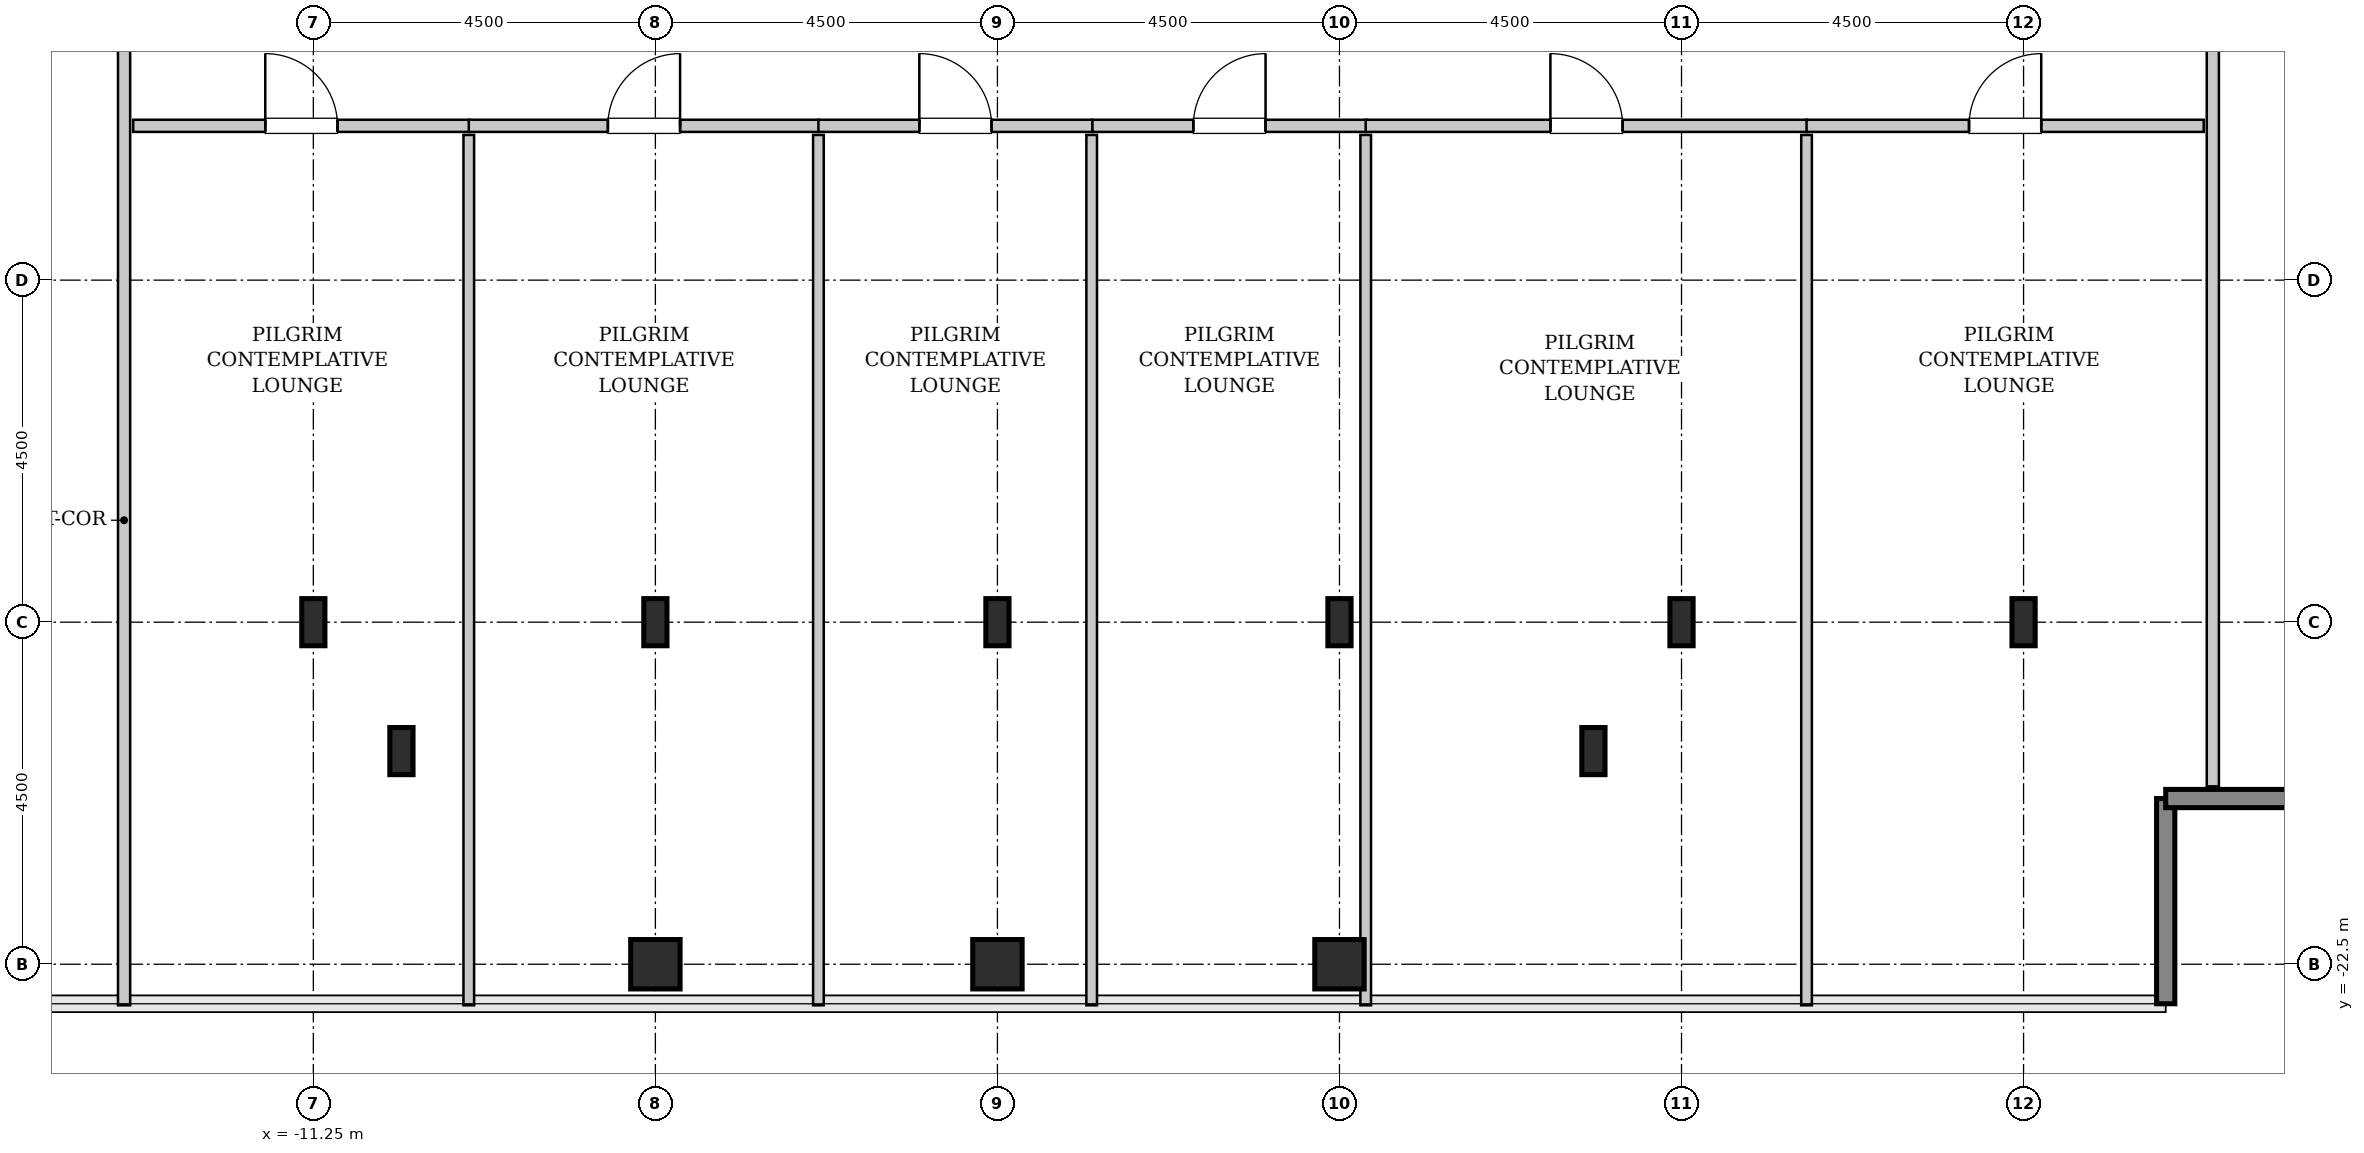
"""IFC4 building model, lengths in metres.
Left out: names, types, materials, properties, quantities, classifications, styles, units other than length and angle.
Written with IfcOpenShell. Run it as: python <this file> out.ifc"""

import sys

from ifc_helpers import new_model, si_unit, direction, frame, frame_2d, origin, origin_2d, place, context, subcontext, project, spatial, rectangle, hollow_rectangle, i_section, extrude, source, transform, mapped, element, fill, save


model = new_model("IFC4")
c1 = context("Model", 3, precision=1e-05, world=origin(), true_north=direction((0.0, 1.0)))
c2 = subcontext(c1, "Body", "Model", "MODEL_VIEW")
j1 = project(units=[si_unit("LENGTHUNIT", "METRE"), si_unit("PLANEANGLEUNIT", "RADIAN")], contexts=[c1])
p1 = place(None, origin())
s1 = spatial("IfcSite", under=j1, at=p1, CompositionType="ELEMENT")
p2 = place(p1, origin())
s2 = spatial("IfcBuilding", under=s1, at=p2, CompositionType="ELEMENT")
p3 = place(p2, frame((0.0, 0.0, 264.6)))
s3 = spatial("IfcBuildingStorey", under=s2, at=p3, CompositionType="ELEMENT", Elevation=264.6)
m1 = source(origin(), c2, "Body", "SweptSolid", [
    extrude(i_section(OverallWidth=0.305, OverallDepth=0.62, WebThickness=0.021, FlangeThickness=0.04, FilletRadius=0.027, at=origin_2d()), origin(), (0.0, 0.0, 1.0), 3.8),
])
for number, where, z_axis, x_axis in (
    (1, (-11.25, -18.0, 0.0), (0.0, 0.0, 1.0), (1.0, 0.0, 0.0)),
    (2, (-10.091, -19.696, 0.0), (0.0, 0.0, 1.0), (1.0, 0.0, 0.0)),
):
    element("IfcColumn", number, at=place(p3, frame(where, z_axis=z_axis, x_axis=x_axis)), inside=s3, PredefinedType="COLUMN", context=c2, shape_type="MappedRepresentation", body=[
        mapped(m1, transform((0.0, 0.0, 0.0), x_axis=(1.0, 0.0, 0.0), y_axis=(0.0, 1.0, 0.0), z_axis=(0.0, 0.0, 1.0), scale=1.0)),
    ])
m2 = source(origin(), c2, "Body", "SweptSolid", [
    extrude(hollow_rectangle(XDim=0.65, YDim=0.65, WallThickness=0.032, InnerFilletRadius=0.032, OuterFilletRadius=0.064, at=origin_2d()), origin(), (0.0, 0.0, 1.0), 3.8),
])
p4 = place(p3, frame((-6.75, -22.5, 0.0), z_axis=(0.0, 0.0, 1.0), x_axis=(1.0, 0.0, 0.0)))
e3 = element("IfcColumn", 3, at=p4, inside=s3, PredefinedType="COLUMN", context=c2, shape_type="MappedRepresentation", body=[
    mapped(m2, transform((0.0, 0.0, 0.0), x_axis=(1.0, 0.0, 0.0), y_axis=(0.0, 1.0, 0.0), z_axis=(0.0, 0.0, 1.0), scale=1.0)),
])
p5 = place(p3, frame((-6.75, -18.0, 0.0), z_axis=(0.0, 0.0, 1.0), x_axis=(1.0, 0.0, 0.0)))
e4 = element("IfcColumn", 4, at=p5, inside=s3, PredefinedType="COLUMN", context=c2, shape_type="MappedRepresentation", body=[
    mapped(m1, transform((0.0, 0.0, 0.0), x_axis=(1.0, 0.0, 0.0), y_axis=(0.0, 1.0, 0.0), z_axis=(0.0, 0.0, 1.0), scale=1.0)),
])
p6 = place(p3, frame((-2.25, -22.5, 0.0), z_axis=(0.0, 0.0, 1.0), x_axis=(1.0, 0.0, 0.0)))
e5 = element("IfcColumn", 5, at=p6, inside=s3, PredefinedType="COLUMN", context=c2, shape_type="MappedRepresentation", body=[
    mapped(m2, transform((0.0, 0.0, 0.0), x_axis=(1.0, 0.0, 0.0), y_axis=(0.0, 1.0, 0.0), z_axis=(0.0, 0.0, 1.0), scale=1.0)),
])
p7 = place(p3, frame((-2.25, -18.0, 0.0), z_axis=(0.0, 0.0, 1.0), x_axis=(1.0, 0.0, 0.0)))
e6 = element("IfcColumn", 6, at=p7, inside=s3, PredefinedType="COLUMN", context=c2, shape_type="MappedRepresentation", body=[
    mapped(m1, transform((0.0, 0.0, 0.0), x_axis=(1.0, 0.0, 0.0), y_axis=(0.0, 1.0, 0.0), z_axis=(0.0, 0.0, 1.0), scale=1.0)),
])
p8 = place(p3, frame((2.25, -22.5, 0.0), z_axis=(0.0, 0.0, 1.0), x_axis=(1.0, 0.0, 0.0)))
e7 = element("IfcColumn", 7, at=p8, inside=s3, PredefinedType="COLUMN", context=c2, shape_type="MappedRepresentation", body=[
    mapped(m2, transform((0.0, 0.0, 0.0), x_axis=(1.0, 0.0, 0.0), y_axis=(0.0, 1.0, 0.0), z_axis=(0.0, 0.0, 1.0), scale=1.0)),
])
for number, where, z_axis, x_axis in (
    (8, (2.25, -18.0, 0.0), (0.0, 0.0, 1.0), (1.0, 0.0, 0.0)),
    (9, (5.591, -19.696, 0.0), (0.0, 0.0, 1.0), (1.0, 0.0, 0.0)),
    (10, (6.75, -18.0, 0.0), (0.0, 0.0, 1.0), (1.0, 0.0, 0.0)),
    (11, (11.25, -18.0, 0.0), (0.0, 0.0, 1.0), (1.0, 0.0, 0.0)),
):
    element("IfcColumn", number, at=place(p3, frame(where, z_axis=z_axis, x_axis=x_axis)), inside=s3, PredefinedType="COLUMN", context=c2, shape_type="MappedRepresentation", body=[
        mapped(m1, transform((0.0, 0.0, 0.0), x_axis=(1.0, 0.0, 0.0), y_axis=(0.0, 1.0, 0.0), z_axis=(0.0, 0.0, 1.0), scale=1.0)),
    ])
m3 = source(origin(), c2, "Body", "SweptSolid", [
    extrude(rectangle(XDim=2.7, YDim=0.24, at=frame_2d((1.35, 0.0))), origin(), (0.0, 0.0, 1.0), 3.55),
])
for number, where, z_axis, x_axis in (
    (12, (13.12, -23.02, 0.0), (0.0, 0.0, 1.0), (0.0, 1.0, 0.0)),
    (13, (13.12, -20.32, 0.0), (0.0, 0.0, 1.0), (1.0, 0.0, 0.0)),
):
    element("IfcWall", number, at=place(p3, frame(where, z_axis=z_axis, x_axis=x_axis)), inside=s3, PredefinedType="SHEAR", context=c2, shape_type="MappedRepresentation", body=[
        mapped(m3, transform((0.0, 0.0, 0.0), x_axis=(1.0, 0.0, 0.0), y_axis=(0.0, 1.0, 0.0), z_axis=(0.0, 0.0, 1.0), scale=1.0)),
    ])
m4 = source(origin(), c2, "Body", "SweptSolid", [
    extrude(rectangle(XDim=14.845, YDim=0.16, at=frame_2d((7.422, 0.0))), origin(), (0.0, 0.0, 1.0), 3.535),
])
p9 = place(p3, frame((-13.74, -23.04, 0.0), z_axis=(0.0, 0.0, 1.0), x_axis=(0.0, 1.0, 0.0)))
e14 = element("IfcWall", 14, at=p9, inside=s3, PredefinedType="PARTITIONING", context=c2, shape_type="MappedRepresentation", body=[
    mapped(m4, transform((0.0, 0.0, 0.0), x_axis=(1.0, 0.0, 0.0), y_axis=(0.0, 1.0, 0.0), z_axis=(0.0, 0.0, 1.0), scale=1.0)),
])
p10 = place(p9, frame((12.712, 0.0, 0.0)))
e15 = element("IfcOpeningElement", 15, at=p10, cuts=e14, PredefinedType="OPENING", context=c2, shape_type="SweptSolid", body=[
    extrude(rectangle(XDim=0.95, YDim=2.1, at=frame_2d((0.475, 1.05))), frame((0.0, 0.09, 0.0), z_axis=(0.0, -1.0, 0.0), x_axis=(1.0, 0.0, 0.0)), (0.0, 0.0, 1.0), 0.18),
])
m5 = source(origin(), c2, "Body", "SweptSolid", [
    extrude(rectangle(XDim=11.765, YDim=0.16, at=frame_2d((5.882, 0.0))), origin(), (0.0, 0.0, 1.0), 3.535),
])
p11 = place(p3, frame((13.74, -20.16, 0.0), z_axis=(0.0, 0.0, 1.0), x_axis=(0.0, 1.0, 0.0)))
e16 = element("IfcWall", 16, at=p11, inside=s3, PredefinedType="PARTITIONING", context=c2, shape_type="MappedRepresentation", body=[
    mapped(m5, transform((0.0, 0.0, 0.0), x_axis=(1.0, 0.0, 0.0), y_axis=(0.0, 1.0, 0.0), z_axis=(0.0, 0.0, 1.0), scale=1.0)),
])
p12 = place(p11, frame((9.732, 0.0, 0.0)))
e17 = element("IfcOpeningElement", 17, at=p12, cuts=e16, PredefinedType="OPENING", context=c2, shape_type="SweptSolid", body=[
    extrude(rectangle(XDim=0.95, YDim=2.1, at=frame_2d((0.475, 1.05))), frame((0.0, 0.09, 0.0), z_axis=(0.0, -1.0, 0.0), x_axis=(1.0, 0.0, 0.0)), (0.0, 0.0, 1.0), 0.18),
])
m6 = source(origin(), c2, "Body", "SweptSolid", [
    extrude(rectangle(XDim=4.425, YDim=0.16, at=frame_2d((2.212, 0.0))), origin(), (0.0, 0.0, 1.0), 3.535),
])
p13 = place(p3, frame((-13.62, -11.47, 0.0), z_axis=(0.0, 0.0, 1.0), x_axis=(1.0, 0.0, 0.0)))
e18 = element("IfcWall", 18, at=p13, inside=s3, PredefinedType="PARTITIONING", context=c2, shape_type="MappedRepresentation", body=[
    mapped(m6, transform((0.0, 0.0, 0.0), x_axis=(1.0, 0.0, 0.0), y_axis=(0.0, 1.0, 0.0), z_axis=(0.0, 0.0, 1.0), scale=1.0)),
])
p14 = place(p13, frame((1.738, 0.0, 0.0)))
e19 = element("IfcOpeningElement", 19, at=p14, cuts=e18, PredefinedType="OPENING", context=c2, shape_type="SweptSolid", body=[
    extrude(rectangle(XDim=0.95, YDim=2.1, at=frame_2d((0.475, 1.05))), frame((0.0, 0.09, 0.0), z_axis=(0.0, -1.0, 0.0), x_axis=(1.0, 0.0, 0.0)), (0.0, 0.0, 1.0), 0.18),
])
m7 = source(origin(), c2, "Body", "SweptSolid", [
    extrude(rectangle(XDim=11.45, YDim=0.14, at=frame_2d((5.725, 0.0))), origin(), (0.0, 0.0, 1.0), 3.535),
])
p15 = place(p3, frame((-9.205, -23.04, 0.0), z_axis=(0.0, 0.0, 1.0), x_axis=(0.0, 1.0, 0.0)))
e20 = element("IfcWall", 20, at=p15, inside=s3, PredefinedType="PARTITIONING", context=c2, shape_type="MappedRepresentation", body=[
    mapped(m7, transform((0.0, 0.0, 0.0), x_axis=(1.0, 0.0, 0.0), y_axis=(0.0, 1.0, 0.0), z_axis=(0.0, 0.0, 1.0), scale=1.0)),
])
m8 = source(origin(), c2, "Body", "SweptSolid", [
    extrude(rectangle(XDim=4.61, YDim=0.16, at=frame_2d((2.305, 0.0))), origin(), (0.0, 0.0, 1.0), 3.535),
])
p16 = place(p3, frame((-9.205, -11.47, 0.0), z_axis=(0.0, 0.0, 1.0), x_axis=(1.0, 0.0, 0.0)))
e21 = element("IfcWall", 21, at=p16, inside=s3, PredefinedType="PARTITIONING", context=c2, shape_type="MappedRepresentation", body=[
    mapped(m8, transform((0.0, 0.0, 0.0), x_axis=(1.0, 0.0, 0.0), y_axis=(0.0, 1.0, 0.0), z_axis=(0.0, 0.0, 1.0), scale=1.0)),
])
p17 = place(p16, frame((1.83, 0.0, 0.0)))
e22 = element("IfcOpeningElement", 22, at=p17, cuts=e21, PredefinedType="OPENING", context=c2, shape_type="SweptSolid", body=[
    extrude(rectangle(XDim=0.95, YDim=2.1, at=frame_2d((0.475, 1.05))), frame((0.0, 0.09, 0.0), z_axis=(0.0, -1.0, 0.0), x_axis=(1.0, 0.0, 0.0)), (0.0, 0.0, 1.0), 0.18),
])
p18 = place(p3, frame((-4.605, -23.04, 0.0), z_axis=(0.0, 0.0, 1.0), x_axis=(0.0, 1.0, 0.0)))
e23 = element("IfcWall", 23, at=p18, inside=s3, PredefinedType="PARTITIONING", context=c2, shape_type="MappedRepresentation", body=[
    mapped(m7, transform((0.0, 0.0, 0.0), x_axis=(1.0, 0.0, 0.0), y_axis=(0.0, 1.0, 0.0), z_axis=(0.0, 0.0, 1.0), scale=1.0)),
])
m9 = source(origin(), c2, "Body", "SweptSolid", [
    extrude(rectangle(XDim=3.605, YDim=0.16, at=frame_2d((1.802, 0.0))), origin(), (0.0, 0.0, 1.0), 3.535),
])
p19 = place(p3, frame((-4.605, -11.47, 0.0), z_axis=(0.0, 0.0, 1.0), x_axis=(1.0, 0.0, 0.0)))
e24 = element("IfcWall", 24, at=p19, inside=s3, PredefinedType="PARTITIONING", context=c2, shape_type="MappedRepresentation", body=[
    mapped(m9, transform((0.0, 0.0, 0.0), x_axis=(1.0, 0.0, 0.0), y_axis=(0.0, 1.0, 0.0), z_axis=(0.0, 0.0, 1.0), scale=1.0)),
])
p20 = place(p19, frame((1.327, 0.0, 0.0)))
e25 = element("IfcOpeningElement", 25, at=p20, cuts=e24, PredefinedType="OPENING", context=c2, shape_type="SweptSolid", body=[
    extrude(rectangle(XDim=0.95, YDim=2.1, at=frame_2d((0.475, 1.05))), frame((0.0, 0.09, 0.0), z_axis=(0.0, -1.0, 0.0), x_axis=(1.0, 0.0, 0.0)), (0.0, 0.0, 1.0), 0.18),
])
p21 = place(p3, frame((-1.01, -23.04, 0.0), z_axis=(0.0, 0.0, 1.0), x_axis=(0.0, 1.0, 0.0)))
e26 = element("IfcWall", 26, at=p21, inside=s3, PredefinedType="PARTITIONING", context=c2, shape_type="MappedRepresentation", body=[
    mapped(m7, transform((0.0, 0.0, 0.0), x_axis=(1.0, 0.0, 0.0), y_axis=(0.0, 1.0, 0.0), z_axis=(0.0, 0.0, 1.0), scale=1.0)),
])
p22 = place(p3, frame((-1.0, -11.47, 0.0), z_axis=(0.0, 0.0, 1.0), x_axis=(1.0, 0.0, 0.0)))
e27 = element("IfcWall", 27, at=p22, inside=s3, PredefinedType="PARTITIONING", context=c2, shape_type="MappedRepresentation", body=[
    mapped(m9, transform((0.0, 0.0, 0.0), x_axis=(1.0, 0.0, 0.0), y_axis=(0.0, 1.0, 0.0), z_axis=(0.0, 0.0, 1.0), scale=1.0)),
])
p23 = place(p22, frame((1.327, 0.0, 0.0)))
e28 = element("IfcOpeningElement", 28, at=p23, cuts=e27, PredefinedType="OPENING", context=c2, shape_type="SweptSolid", body=[
    extrude(rectangle(XDim=0.95, YDim=2.1, at=frame_2d((0.475, 1.05))), frame((0.0, 0.09, 0.0), z_axis=(0.0, -1.0, 0.0), x_axis=(1.0, 0.0, 0.0)), (0.0, 0.0, 1.0), 0.18),
])
m10 = source(origin(), c2, "Body", "SweptSolid", [
    extrude(rectangle(XDim=11.45, YDim=0.14, at=frame_2d((5.725, 0.0))), origin(), (0.0, 0.0, 1.0), 2.925),
])
p24 = place(p3, frame((2.595, -23.04, 0.0), z_axis=(0.0, 0.0, 1.0), x_axis=(0.0, 1.0, 0.0)))
e29 = element("IfcWall", 29, at=p24, inside=s3, PredefinedType="PARTITIONING", context=c2, shape_type="MappedRepresentation", body=[
    mapped(m10, transform((0.0, 0.0, 0.0), x_axis=(1.0, 0.0, 0.0), y_axis=(0.0, 1.0, 0.0), z_axis=(0.0, 0.0, 1.0), scale=1.0)),
])
m11 = source(origin(), c2, "Body", "SweptSolid", [
    extrude(rectangle(XDim=5.81, YDim=0.16, at=frame_2d((2.905, 0.0))), origin(), (0.0, 0.0, 1.0), 3.535),
])
p25 = place(p3, frame((2.595, -11.47, 0.0), z_axis=(0.0, 0.0, 1.0), x_axis=(1.0, 0.0, 0.0)))
e30 = element("IfcWall", 30, at=p25, inside=s3, PredefinedType="PARTITIONING", context=c2, shape_type="MappedRepresentation", body=[
    mapped(m11, transform((0.0, 0.0, 0.0), x_axis=(1.0, 0.0, 0.0), y_axis=(0.0, 1.0, 0.0), z_axis=(0.0, 0.0, 1.0), scale=1.0)),
])
p26 = place(p25, frame((2.43, 0.0, 0.0)))
e31 = element("IfcOpeningElement", 31, at=p26, cuts=e30, PredefinedType="OPENING", context=c2, shape_type="SweptSolid", body=[
    extrude(rectangle(XDim=0.95, YDim=2.1, at=frame_2d((0.475, 1.05))), frame((0.0, 0.09, 0.0), z_axis=(0.0, -1.0, 0.0), x_axis=(1.0, 0.0, 0.0)), (0.0, 0.0, 1.0), 0.18),
])
p27 = place(p3, frame((8.395, -23.04, 0.0), z_axis=(0.0, 0.0, 1.0), x_axis=(0.0, 1.0, 0.0)))
e32 = element("IfcWall", 32, at=p27, inside=s3, PredefinedType="PARTITIONING", context=c2, shape_type="MappedRepresentation", body=[
    mapped(m7, transform((0.0, 0.0, 0.0), x_axis=(1.0, 0.0, 0.0), y_axis=(0.0, 1.0, 0.0), z_axis=(0.0, 0.0, 1.0), scale=1.0)),
])
m12 = source(origin(), c2, "Body", "SweptSolid", [
    extrude(rectangle(XDim=5.225, YDim=0.16, at=frame_2d((2.613, 0.0))), origin(), (0.0, 0.0, 1.0), 3.535),
])
p28 = place(p3, frame((8.395, -11.47, 0.0), z_axis=(0.0, 0.0, 1.0), x_axis=(1.0, 0.0, 0.0)))
e33 = element("IfcWall", 33, at=p28, inside=s3, PredefinedType="PARTITIONING", context=c2, shape_type="MappedRepresentation", body=[
    mapped(m12, transform((0.0, 0.0, 0.0), x_axis=(1.0, 0.0, 0.0), y_axis=(0.0, 1.0, 0.0), z_axis=(0.0, 0.0, 1.0), scale=1.0)),
])
p29 = place(p28, frame((2.137, 0.0, 0.0)))
e34 = element("IfcOpeningElement", 34, at=p29, cuts=e33, PredefinedType="OPENING", context=c2, shape_type="SweptSolid", body=[
    extrude(rectangle(XDim=0.95, YDim=2.1, at=frame_2d((0.475, 1.05))), frame((0.0, 0.09, 0.0), z_axis=(0.0, -1.0, 0.0), x_axis=(1.0, 0.0, 0.0)), (0.0, 0.0, 1.0), 0.18),
])
m13 = source(origin(), c2, "Body", "SweptSolid", [
    extrude(rectangle(XDim=0.95, YDim=2.1, at=frame_2d((0.475, 1.05))), frame((0.0, 0.025, 0.0), z_axis=(0.0, -1.0, 0.0), x_axis=(1.0, 0.0, 0.0)), (0.0, 0.0, 1.0), 0.05),
])
p30 = place(p14, origin())
e35 = element("IfcDoor", 35, at=p30, inside=s3, OperationType="SINGLE_SWING_LEFT", PredefinedType="DOOR", context=c2, shape_type="MappedRepresentation", body=[
    mapped(m13, transform((0.0, 0.0, 0.0), x_axis=(1.0, 0.0, 0.0), y_axis=(0.0, 1.0, 0.0), z_axis=(0.0, 0.0, 1.0), scale=1.0)),
])
fill(e19, e35)
p31 = place(p17, origin())
e36 = element("IfcDoor", 36, at=p31, inside=s3, OperationType="SINGLE_SWING_RIGHT", PredefinedType="DOOR", context=c2, shape_type="MappedRepresentation", body=[
    mapped(m13, transform((0.0, 0.0, 0.0), x_axis=(1.0, 0.0, 0.0), y_axis=(0.0, 1.0, 0.0), z_axis=(0.0, 0.0, 1.0), scale=1.0)),
])
fill(e22, e36)
p32 = place(p20, origin())
e37 = element("IfcDoor", 37, at=p32, inside=s3, OperationType="SINGLE_SWING_LEFT", PredefinedType="DOOR", context=c2, shape_type="MappedRepresentation", body=[
    mapped(m13, transform((0.0, 0.0, 0.0), x_axis=(1.0, 0.0, 0.0), y_axis=(0.0, 1.0, 0.0), z_axis=(0.0, 0.0, 1.0), scale=1.0)),
])
fill(e25, e37)
p33 = place(p23, origin())
e38 = element("IfcDoor", 38, at=p33, inside=s3, OperationType="SINGLE_SWING_RIGHT", PredefinedType="DOOR", context=c2, shape_type="MappedRepresentation", body=[
    mapped(m13, transform((0.0, 0.0, 0.0), x_axis=(1.0, 0.0, 0.0), y_axis=(0.0, 1.0, 0.0), z_axis=(0.0, 0.0, 1.0), scale=1.0)),
])
fill(e28, e38)
p34 = place(p26, origin())
e39 = element("IfcDoor", 39, at=p34, inside=s3, OperationType="SINGLE_SWING_LEFT", PredefinedType="DOOR", context=c2, shape_type="MappedRepresentation", body=[
    mapped(m13, transform((0.0, 0.0, 0.0), x_axis=(1.0, 0.0, 0.0), y_axis=(0.0, 1.0, 0.0), z_axis=(0.0, 0.0, 1.0), scale=1.0)),
])
fill(e31, e39)
p35 = place(p29, origin())
e40 = element("IfcDoor", 40, at=p35, inside=s3, OperationType="SINGLE_SWING_RIGHT", PredefinedType="DOOR", context=c2, shape_type="MappedRepresentation", body=[
    mapped(m13, transform((0.0, 0.0, 0.0), x_axis=(1.0, 0.0, 0.0), y_axis=(0.0, 1.0, 0.0), z_axis=(0.0, 0.0, 1.0), scale=1.0)),
])
fill(e34, e40)
save(model, sys.argv[1])
